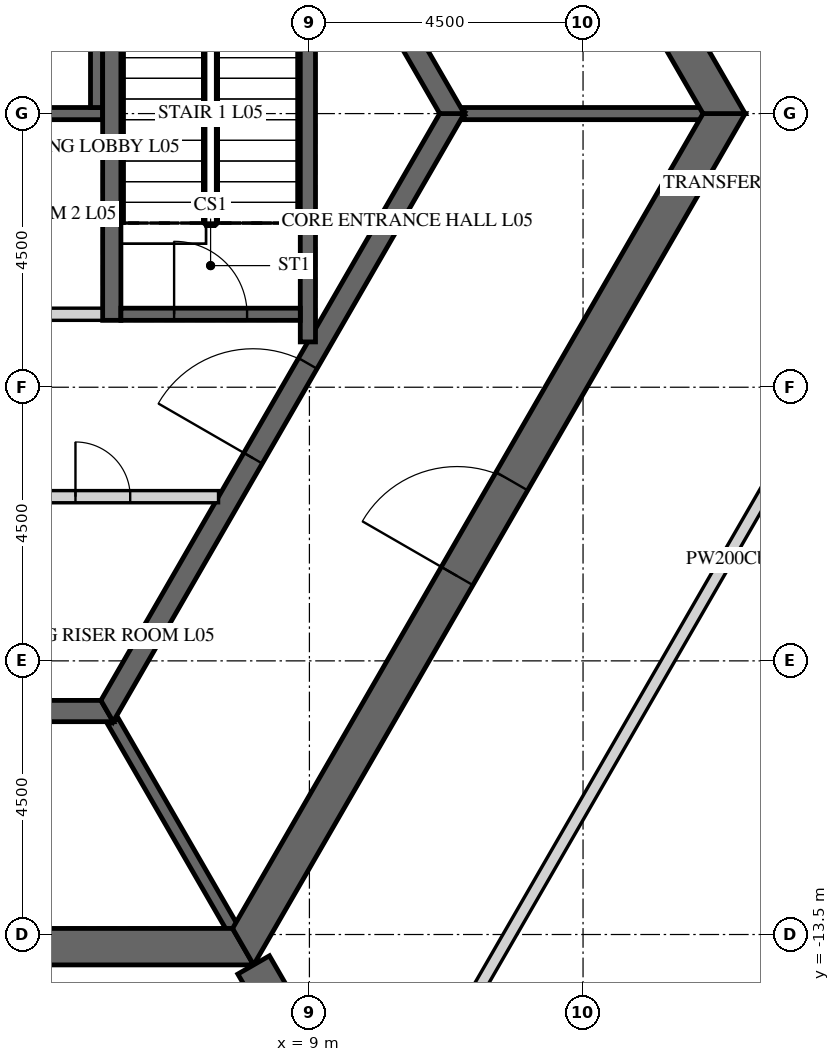
"""IFC4 building model, lengths in metres.
Left out: names, types, materials, properties, quantities, classifications, styles, units other than length and angle.
Written with IfcOpenShell. Run it as: python <this file> out.ifc"""

import sys

from ifc_helpers import new_model, si_unit, direction, frame, frame_2d, origin, place, context, subcontext, project, spatial, polyline, rectangle, outline, extrude, element, fill, save


model = new_model("IFC4")
c1 = context("Model", 3, precision=1e-05, world=origin(), true_north=direction((0.0, 1.0)))
c2 = subcontext(c1, "Body", "Model", "MODEL_VIEW")
j1 = project(units=[si_unit("LENGTHUNIT", "METRE"), si_unit("PLANEANGLEUNIT", "RADIAN")], contexts=[c1])
p1 = place(None, origin())
s1 = spatial("IfcSite", under=j1, at=p1, CompositionType="ELEMENT")
p2 = place(p1, origin())
s2 = spatial("IfcBuilding", under=s1, at=p2, CompositionType="ELEMENT")
p3 = place(p2, frame((0.0, 0.0, 31.5)))
s3 = spatial("IfcBuildingStorey", under=s2, at=p3, CompositionType="ELEMENT", Elevation=31.5)
p4 = place(p3, frame((-7.91, -13.7, -0.3), z_axis=(0.0, 0.0, 1.0), x_axis=(1.0, 0.0, 0.0)))
e1 = element("IfcWall", 1, at=p4, inside=s3, PredefinedType="SHEAR", context=c2, shape_type="SweptSolid", body=[
    extrude(outline(polyline([(-0.173, -0.3), (15.993, -0.3), (15.646, 0.3), (0.173, 0.3), (-0.173, -0.3)])), origin(), (0.0, 0.0, 1.0), 6.15),
])
p5 = place(p4, frame((7.31, 0.0, 0.3)))
e2 = element("IfcOpeningElement", 2, at=p5, cuts=e1, PredefinedType="OPENING", context=c2, shape_type="SweptSolid", body=[
    extrude(rectangle(XDim=1.2, YDim=2.4, at=frame_2d((0.6, 1.2))), frame((0.0, 0.31, 0.0), z_axis=(0.0, -1.0, 0.0), x_axis=(1.0, 0.0, 0.0)), (0.0, 0.0, 1.0), 0.62),
])
p6 = place(p3, frame((7.91, -13.7, -0.3), z_axis=(0.0, 0.0, 1.0), x_axis=(0.499999880136, 0.866025472988, 0.0)))
e3 = element("IfcWall", 3, at=p6, inside=s3, PredefinedType="SHEAR", context=c2, shape_type="SweptSolid", body=[
    extrude(outline(polyline([(-0.173, -0.3), (15.993, -0.3), (15.646, 0.3), (0.173, 0.3), (-0.173, -0.3)])), origin(), (0.0, 0.0, 1.0), 6.15),
])
p7 = place(p6, frame((7.039, 0.0, 0.3)))
e4 = element("IfcOpeningElement", 4, at=p7, cuts=e3, PredefinedType="OPENING", context=c2, shape_type="SweptSolid", body=[
    extrude(rectangle(XDim=1.8, YDim=2.4, at=frame_2d((0.9, 1.2))), frame((0.0, 0.31, 0.0), z_axis=(0.0, -1.0, 0.0), x_axis=(1.0, 0.0, 0.0)), (0.0, 0.0, 1.0), 0.62),
])
p8 = place(p3, frame((15.819, 0.0, -0.3), z_axis=(0.0, 0.0, 1.0), x_axis=(-0.499999880136, 0.866025472988, 0.0)))
e5 = element("IfcWall", 5, at=p8, inside=s3, PredefinedType="SHEAR", context=c2, shape_type="SweptSolid", body=[
    extrude(outline(polyline([(-0.173, -0.3), (15.993, -0.3), (15.646, 0.3), (0.173, 0.3), (-0.173, -0.3)])), origin(), (0.0, 0.0, 1.0), 6.15),
])
p9 = place(p8, frame((6.981, 0.0, 0.3)))
e6 = element("IfcOpeningElement", 6, at=p9, cuts=e5, PredefinedType="OPENING", context=c2, shape_type="SweptSolid", body=[
    extrude(rectangle(XDim=1.8, YDim=2.4, at=frame_2d((0.9, 1.2))), frame((0.0, 0.31, 0.0), z_axis=(0.0, -1.0, 0.0), x_axis=(1.0, 0.0, 0.0)), (0.0, 0.0, 1.0), 0.62),
])
p10 = place(p3, frame((8.083, -14.0, -0.3), z_axis=(0.0, 0.0, 1.0), x_axis=(0.499997680643, -0.866026742862, 0.0)))
e7 = element("IfcWall", 7, at=p10, inside=s3, PredefinedType="SHEAR", context=c2, shape_type="SweptSolid", body=[
    extrude(rectangle(XDim=16.509, YDim=0.6, at=frame_2d((8.254, 0.0))), origin(), (0.0, 0.0, 1.0), 6.15),
])
p11 = place(p10, frame((7.354, 0.0, 0.3)))
e8 = element("IfcOpeningElement", 8, at=p11, cuts=e7, PredefinedType="OPENING", context=c2, shape_type="SweptSolid", body=[
    extrude(rectangle(XDim=1.8, YDim=2.4, at=frame_2d((0.9, 1.2))), frame((0.0, 0.31, 0.0), z_axis=(0.0, -1.0, 0.0), x_axis=(1.0, 0.0, 0.0)), (0.0, 0.0, 1.0), 0.62),
])
p12 = place(p3, frame((-5.673, -9.825, -0.3), z_axis=(0.0, 0.0, 1.0), x_axis=(1.0, 0.0, 0.0)))
e9 = element("IfcWall", 9, at=p12, inside=s3, PredefinedType="SHEAR", context=c2, shape_type="SweptSolid", body=[
    extrude(outline(polyline([(-0.101, -0.175), (11.446, -0.175), (11.244, 0.175), (0.101, 0.175), (-0.101, -0.175)])), origin(), (0.0, 0.0, 1.0), 6.15),
])
p13 = place(p3, frame((5.673, -9.825, -0.3), z_axis=(0.0, 0.0, 1.0), x_axis=(0.499995046907, 0.866028263435, 0.0)))
e10 = element("IfcWall", 10, at=p13, inside=s3, PredefinedType="SHEAR", context=c2, shape_type="SweptSolid", body=[
    extrude(outline(polyline([(-0.101, -0.175), (11.446, -0.175), (11.244, 0.175), (0.101, 0.175), (-0.101, -0.175)])), origin(), (0.0, 0.0, 1.0), 6.15),
])
p14 = place(p13, frame((4.801, 0.0, 0.3)))
e11 = element("IfcOpeningElement", 11, at=p14, cuts=e10, PredefinedType="OPENING", context=c2, shape_type="SweptSolid", body=[
    extrude(rectangle(XDim=1.8, YDim=2.4, at=frame_2d((0.9, 1.2))), frame((0.0, 0.185, 0.0), z_axis=(0.0, -1.0, 0.0), x_axis=(1.0, 0.0, 0.0)), (0.0, 0.0, 1.0), 0.37),
])
p15 = place(p3, frame((11.345, 0.0, -0.3), z_axis=(0.0, 0.0, 1.0), x_axis=(-0.499995046907, 0.866028263435, 0.0)))
e12 = element("IfcWall", 12, at=p15, inside=s3, PredefinedType="SHEAR", context=c2, shape_type="SweptSolid", body=[
    extrude(outline(polyline([(-0.101, -0.175), (11.446, -0.175), (11.244, 0.175), (0.101, 0.175), (-0.101, -0.175)])), origin(), (0.0, 0.0, 1.0), 6.15),
])
p16 = place(p15, frame((4.744, 0.0, 0.3)))
e13 = element("IfcOpeningElement", 13, at=p16, cuts=e12, PredefinedType="OPENING", context=c2, shape_type="SweptSolid", body=[
    extrude(rectangle(XDim=1.8, YDim=2.4, at=frame_2d((0.9, 1.2))), frame((0.0, 0.185, 0.0), z_axis=(0.0, -1.0, 0.0), x_axis=(1.0, 0.0, 0.0)), (0.0, 0.0, 1.0), 0.37),
])
p17 = place(p3, frame((-5.6, 0.0, -0.25), z_axis=(0.0, 0.0, 1.0), x_axis=(1.0, 0.0, 0.0)))
e14 = element("IfcWall", 14, at=p17, inside=s3, PredefinedType="SHEAR", context=c2, shape_type="SweptSolid", body=[
    extrude(rectangle(XDim=11.2, YDim=0.2, at=frame_2d((5.6, 0.0))), origin(), (0.0, 0.0, 1.0), 6.0),
])
p18 = place(p3, frame((5.5, 0.1, -0.25), z_axis=(0.0, 0.0, 1.0), x_axis=(0.0, 1.0, 0.0)))
e15 = element("IfcWall", 15, at=p18, inside=s3, PredefinedType="SHEAR", context=c2, shape_type="SweptSolid", body=[
    extrude(rectangle(XDim=3.1, YDim=0.2, at=frame_2d((1.55, 0.0))), origin(), (0.0, 0.0, 1.0), 6.0),
])
p19 = place(p3, frame((0.1, -3.3, 0.0), z_axis=(0.0, 0.0, 1.0), x_axis=(1.0, 0.0, 0.0)))
e16 = element("IfcWall", 16, at=p19, inside=s3, PredefinedType="PARTITIONING", context=c2, shape_type="SweptSolid", body=[
    extrude(rectangle(XDim=5.5, YDim=0.2, at=frame_2d((2.75, 0.0))), origin(), (0.0, 0.0, 1.0), 5.75),
])
p20 = place(p19, frame((2.3, 0.0, 0.0)))
e17 = element("IfcOpeningElement", 17, at=p20, cuts=e16, PredefinedType="OPENING", context=c2, shape_type="SweptSolid", body=[
    extrude(rectangle(XDim=0.9, YDim=2.1, at=frame_2d((0.45, 1.05))), frame((0.0, 0.11, 0.0), z_axis=(0.0, -1.0, 0.0), x_axis=(1.0, 0.0, 0.0)), (0.0, 0.0, 1.0), 0.22),
])
p21 = place(p3, frame((3.7, -6.3, 0.0), z_axis=(0.0, 0.0, 1.0), x_axis=(1.0, 0.0, 0.0)))
e18 = element("IfcWall", 18, at=p21, inside=s3, PredefinedType="PARTITIONING", context=c2, shape_type="SweptSolid", body=[
    extrude(rectangle(XDim=3.806, YDim=0.2, at=frame_2d((1.903, 0.0))), origin(), (0.0, 0.0, 1.0), 5.75),
])
p22 = place(p21, frame((1.453, 0.0, 0.0)))
e19 = element("IfcOpeningElement", 19, at=p22, cuts=e18, PredefinedType="OPENING", context=c2, shape_type="SweptSolid", body=[
    extrude(rectangle(XDim=0.9, YDim=2.1, at=frame_2d((0.45, 1.05))), frame((0.0, 0.11, 0.0), z_axis=(0.0, -1.0, 0.0), x_axis=(1.0, 0.0, 0.0)), (0.0, 0.0, 1.0), 0.22),
])
p23 = place(p3, frame((11.547, 0.0, -0.3), z_axis=(0.0, 0.0, 1.0), x_axis=(1.0, 0.0, 0.0)))
e20 = element("IfcWall", 20, at=p23, inside=s3, PredefinedType="SHEAR", context=c2, shape_type="SweptSolid", body=[
    extrude(rectangle(XDim=3.926, YDim=0.2, at=frame_2d((1.963, 0.0))), origin(), (0.0, 0.0, 1.0), 6.15),
])
p24 = place(p3, frame((5.773, -10.0, -0.3), z_axis=(0.0, 0.0, 1.0), x_axis=(0.500038251005, -0.86600331843, 0.0)))
e21 = element("IfcWall", 21, at=p24, inside=s3, PredefinedType="SHEAR", context=c2, shape_type="SweptSolid", body=[
    extrude(rectangle(XDim=3.926, YDim=0.2, at=frame_2d((1.963, 0.0))), origin(), (0.0, 0.0, 1.0), 6.15),
])
p25 = place(p3, frame((5.75, -3.4, -0.25), z_axis=(0.0, 0.0, 1.0), x_axis=(0.0, 1.0, 0.0)))
e22 = element("IfcWall", 22, at=p25, inside=s3, PredefinedType="SHEAR", context=c2, shape_type="SweptSolid", body=[
    extrude(rectangle(XDim=6.8, YDim=0.3, at=frame_2d((3.4, 0.0))), origin(), (0.0, 0.0, 1.0), 6.0),
])
p26 = place(p3, frame((8.975, -3.755, -0.25), z_axis=(0.0, 0.0, 1.0), x_axis=(0.0, 1.0, 0.0)))
e23 = element("IfcWall", 23, at=p26, inside=s3, PredefinedType="SHEAR", context=c2, shape_type="SweptSolid", body=[
    extrude(rectangle(XDim=7.51, YDim=0.25, at=frame_2d((3.755, 0.0))), origin(), (0.0, 0.0, 1.0), 6.0),
])
p27 = place(p3, frame((5.9, -3.3, -0.25), z_axis=(0.0, 0.0, 1.0), x_axis=(1.0, 0.0, 0.0)))
e24 = element("IfcWall", 24, at=p27, inside=s3, PredefinedType="SHEAR", context=c2, shape_type="SweptSolid", body=[
    extrude(rectangle(XDim=2.95, YDim=0.2, at=frame_2d((1.475, 0.0))), origin(), (0.0, 0.0, 1.0), 6.0),
])
p28 = place(p27, frame((0.875, 0.0, 0.25)))
e25 = element("IfcOpeningElement", 25, at=p28, cuts=e24, PredefinedType="OPENING", context=c2, shape_type="SweptSolid", body=[
    extrude(rectangle(XDim=1.2, YDim=2.4, at=frame_2d((0.6, 1.2))), frame((0.0, 0.11, 0.0), z_axis=(0.0, -1.0, 0.0), x_axis=(1.0, 0.0, 0.0)), (0.0, 0.0, 1.0), 0.22),
])
p29 = place(p3, frame((11.624, -14.666, 0.0), z_axis=(0.0, 0.0, 1.0), x_axis=(0.500026107117, 0.866010330309, 0.0)))
e26 = element("IfcWall", 26, at=p29, inside=s3, PredefinedType="PARTITIONING", context=c2, shape_type="SweptSolid", body=[
    extrude(rectangle(XDim=16.935, YDim=0.2, at=frame_2d((8.468, 0.0))), origin(), (0.0, 0.0, 1.0), 5.85),
])
p30 = place(p3, frame((26.555, -5.645, 0.0), z_axis=(0.0, 0.0, 1.0), x_axis=(-0.500000552801, -0.866025084624, 0.0)))
e27 = element("IfcWall", 27, at=p30, inside=s3, PredefinedType="PARTITIONING", context=c2, shape_type="SweptSolid", body=[
    extrude(rectangle(XDim=22.95, YDim=0.2, at=frame_2d((11.475, 0.0))), origin(), (0.0, 0.0, 1.0), 5.85),
])
p31 = place(p30, frame((10.975, 0.0, 0.0)))
e28 = element("IfcOpeningElement", 28, at=p31, cuts=e27, PredefinedType="OPENING", context=c2, shape_type="SweptSolid", body=[
    extrude(rectangle(XDim=1.0, YDim=2.1, at=frame_2d((0.5, 1.05))), frame((0.0, 0.11, 0.0), z_axis=(0.0, -1.0, 0.0), x_axis=(1.0, 0.0, 0.0)), (0.0, 0.0, 1.0), 0.22),
])
p32 = place(p3, frame((15.433, -19.31, 0.0), z_axis=(0.0, 0.0, 1.0), x_axis=(0.499986369096, 0.866033273447, 0.0)))
e29 = element("IfcWall", 29, at=p32, inside=s3, PredefinedType="PARTITIONING", context=c2, shape_type="SweptSolid", body=[
    extrude(rectangle(XDim=22.181, YDim=0.2, at=frame_2d((11.091, 0.0))), origin(), (0.0, 0.0, 1.0), 5.85),
])
p33 = place(p32, frame((10.591, 0.0, 0.0)))
e30 = element("IfcOpeningElement", 30, at=p33, cuts=e29, PredefinedType="OPENING", context=c2, shape_type="SweptSolid", body=[
    extrude(rectangle(XDim=1.0, YDim=2.1, at=frame_2d((0.5, 1.05))), frame((0.0, 0.11, 0.0), z_axis=(0.0, -1.0, 0.0), x_axis=(1.0, 0.0, 0.0)), (0.0, 0.0, 1.0), 0.22),
])
p34 = place(p7, origin())
e31 = element("IfcDoor", 31, at=p34, inside=s3, OperationType="DOUBLE_DOOR_SINGLE_SWING", PredefinedType="DOOR", context=c2, shape_type="SweptSolid", body=[
    extrude(rectangle(XDim=1.8, YDim=2.4, at=frame_2d((0.9, 1.2))), frame((0.0, 0.025, 0.0), z_axis=(0.0, -1.0, 0.0), x_axis=(1.0, 0.0, 0.0)), (0.0, 0.0, 1.0), 0.05),
])
fill(e4, e31)
p35 = place(p14, origin())
e32 = element("IfcDoor", 32, at=p35, inside=s3, OperationType="DOUBLE_DOOR_SINGLE_SWING", PredefinedType="DOOR", context=c2, shape_type="SweptSolid", body=[
    extrude(rectangle(XDim=1.8, YDim=2.4, at=frame_2d((0.9, 1.2))), frame((0.0, 0.025, 0.0), z_axis=(0.0, -1.0, 0.0), x_axis=(1.0, 0.0, 0.0)), (0.0, 0.0, 1.0), 0.05),
])
fill(e11, e32)
p36 = place(p22, origin())
e33 = element("IfcDoor", 33, at=p36, inside=s3, OperationType="SINGLE_SWING_LEFT", PredefinedType="DOOR", context=c2, shape_type="SweptSolid", body=[
    extrude(rectangle(XDim=0.9, YDim=2.1, at=frame_2d((0.45, 1.05))), frame((0.0, 0.025, 0.0), z_axis=(0.0, -1.0, 0.0), x_axis=(1.0, 0.0, 0.0)), (0.0, 0.0, 1.0), 0.05),
])
fill(e19, e33)
p37 = place(p28, origin())
e34 = element("IfcDoor", 34, at=p37, inside=s3, OperationType="SINGLE_SWING_LEFT", PredefinedType="DOOR", context=c2, shape_type="SweptSolid", body=[
    extrude(rectangle(XDim=1.2, YDim=2.4, at=frame_2d((0.6, 1.2))), frame((0.0, 0.025, 0.0), z_axis=(0.0, -1.0, 0.0), x_axis=(1.0, 0.0, 0.0)), (0.0, 0.0, 1.0), 0.05),
])
fill(e25, e34)
save(model, sys.argv[1])
